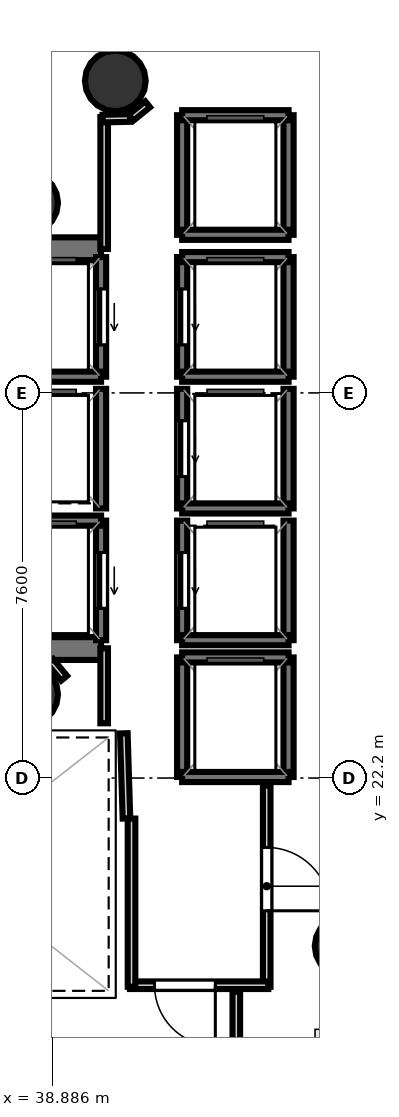
"""IFC4 building model, lengths in metres.
Left out: names, types, materials, properties, quantities, classifications, styles, units other than length and angle.
Written with IfcOpenShell. Run it as: python <this file> out.ifc"""

import sys

from ifc_helpers import new_model, si_unit, direction, frame, frame_2d, origin, origin_2d, place, context, subcontext, project, spatial, rectangle, hollow_circle, extrude, element, fill, save


model = new_model("IFC4")
c1 = context("Model", 3, precision=1e-05, world=origin(), true_north=direction((0.0, 1.0)))
c2 = subcontext(c1, "Body", "Model", "MODEL_VIEW")
j1 = project(units=[si_unit("LENGTHUNIT", "METRE"), si_unit("PLANEANGLEUNIT", "RADIAN")], contexts=[c1])
p1 = place(None, origin())
s1 = spatial("IfcSite", under=j1, at=p1, CompositionType="ELEMENT")
p2 = place(p1, origin())
s2 = spatial("IfcBuilding", under=s1, at=p2, CompositionType="ELEMENT")
p3 = place(p2, frame((0.0, 0.0, 207.7)))
s3 = spatial("IfcBuildingStorey", under=s2, at=p3, CompositionType="ELEMENT", Elevation=207.7)
p4 = place(p3, frame((29.33, 32.645, 0.0), z_axis=(0.0, 0.0, 1.0), x_axis=(1.0, 0.0, 0.0)))
e1 = element("IfcWall", 1, at=p4, inside=s3, PredefinedType="SHEAR", context=c2, shape_type="SweptSolid", body=[
    extrude(rectangle(XDim=10.52, YDim=0.45, at=frame_2d((5.26, 0.0))), origin(), (0.0, 0.0, 1.0), 3.52),
])
p5 = place(p4, frame((0.895, 0.0, 0.0)))
e2 = element("IfcOpeningElement", 2, at=p5, cuts=e1, PredefinedType="OPENING", context=c2, shape_type="SweptSolid", body=[
    extrude(rectangle(XDim=1.25, YDim=2.15, at=frame_2d((0.625, 1.075))), frame((0.0, 0.235, 0.0), z_axis=(0.0, -1.0, 0.0), x_axis=(1.0, 0.0, 0.0)), (0.0, 0.0, 1.0), 0.47),
])
p6 = place(p3, frame((29.33, 24.755, 0.0), z_axis=(0.0, 0.0, 1.0), x_axis=(1.0, 0.0, 0.0)))
e3 = element("IfcWall", 3, at=p6, inside=s3, PredefinedType="SHEAR", context=c2, shape_type="SweptSolid", body=[
    extrude(rectangle(XDim=10.52, YDim=0.45, at=frame_2d((5.26, 0.0))), origin(), (0.0, 0.0, 1.0), 3.52),
])
p7 = place(p6, frame((0.695, 0.0, 0.0)))
e4 = element("IfcOpeningElement", 4, at=p7, cuts=e3, PredefinedType="OPENING", context=c2, shape_type="SweptSolid", body=[
    extrude(rectangle(XDim=1.25, YDim=2.15, at=frame_2d((0.625, 1.075))), frame((0.0, 0.235, 0.0), z_axis=(0.0, -1.0, 0.0), x_axis=(1.0, 0.0, 0.0)), (0.0, 0.0, 1.0), 0.47),
])
for number, where, z_axis, x_axis in (
    (5, (38.4, 33.55, 0.0), (0.0, 0.0, 1.0), (1.0, 0.0, 0.0)),
    (6, (38.4, 23.85, 0.0), (0.0, 0.0, 1.0), (1.0, 0.0, 0.0)),
    (7, (40.131, 35.958, 0.0), (0.0, 0.0, 1.0), (1.0, 0.0, 0.0)),
    (8, (44.667, 18.883, 0.0), (0.0, 0.0, 1.0), (1.0, 0.0, 0.0)),
):
    element("IfcColumn", number, at=place(p3, frame(where, z_axis=z_axis, x_axis=x_axis)), inside=s3, PredefinedType="COLUMN", context=c2, shape_type="SweptSolid", body=[
        extrude(hollow_circle(Radius=0.6, WallThickness=0.03, at=origin_2d()), origin(), (0.0, 0.0, 1.0), 3.7),
    ])
p8 = place(p3, frame((39.85, 30.12, 0.0), z_axis=(0.0, 0.0, 1.0), x_axis=(0.0, 1.0, 0.0)))
e9 = element("IfcWall", 9, at=p8, inside=s3, PredefinedType="SOLIDWALL", context=c2, shape_type="SweptSolid", body=[
    extrude(rectangle(XDim=2.36, YDim=0.2, at=frame_2d((1.18, 0.0))), origin(), (0.0, 0.0, 1.0), 3.52),
])
p9 = place(p8, frame((0.63, 0.0, 0.0)))
e10 = element("IfcOpeningElement", 10, at=p9, cuts=e9, PredefinedType="OPENING", context=c2, shape_type="SweptSolid", body=[
    extrude(rectangle(XDim=1.1, YDim=2.15, at=frame_2d((0.55, 1.075))), frame((0.0, 0.11, 0.0), z_axis=(0.0, -1.0, 0.0), x_axis=(1.0, 0.0, 0.0)), (0.0, 0.0, 1.0), 0.22),
])
p10 = place(p3, frame((37.75, 30.12, 0.0), z_axis=(0.0, 0.0, 1.0), x_axis=(1.0, 0.0, 0.0)))
e11 = element("IfcWall", 11, at=p10, inside=s3, PredefinedType="SOLIDWALL", context=c2, shape_type="SweptSolid", body=[
    extrude(rectangle(XDim=2.1, YDim=0.2, at=frame_2d((1.05, 0.0))), origin(), (0.0, 0.0, 1.0), 3.52),
])
p11 = place(p3, frame((39.85, 24.92, 0.0), z_axis=(0.0, 0.0, 1.0), x_axis=(0.0, 1.0, 0.0)))
e12 = element("IfcWall", 12, at=p11, inside=s3, PredefinedType="SOLIDWALL", context=c2, shape_type="SweptSolid", body=[
    extrude(rectangle(XDim=2.36, YDim=0.2, at=frame_2d((1.18, 0.0))), origin(), (0.0, 0.0, 1.0), 3.52),
])
p12 = place(p11, frame((0.63, 0.0, 0.0)))
e13 = element("IfcOpeningElement", 13, at=p12, cuts=e12, PredefinedType="OPENING", context=c2, shape_type="SweptSolid", body=[
    extrude(rectangle(XDim=1.1, YDim=2.15, at=frame_2d((0.55, 1.075))), frame((0.0, 0.11, 0.0), z_axis=(0.0, -1.0, 0.0), x_axis=(1.0, 0.0, 0.0)), (0.0, 0.0, 1.0), 0.22),
])
p13 = place(p3, frame((37.75, 27.28, 0.0), z_axis=(0.0, 0.0, 1.0), x_axis=(1.0, 0.0, 0.0)))
e14 = element("IfcWall", 14, at=p13, inside=s3, PredefinedType="SOLIDWALL", context=c2, shape_type="SweptSolid", body=[
    extrude(rectangle(XDim=2.1, YDim=0.2, at=frame_2d((1.05, 0.0))), origin(), (0.0, 0.0, 1.0), 3.52),
])
p14 = place(p3, frame((43.55, 30.12, 0.0), z_axis=(0.0, 0.0, 1.0), x_axis=(0.0, 1.0, 0.0)))
e15 = element("IfcWall", 15, at=p14, inside=s3, PredefinedType="SOLIDWALL", context=c2, shape_type="SweptSolid", body=[
    extrude(rectangle(XDim=2.36, YDim=0.2, at=frame_2d((1.18, 0.0))), origin(), (0.0, 0.0, 1.0), 3.52),
])
p15 = place(p3, frame((41.45, 30.12, 0.0), z_axis=(0.0, 0.0, 1.0), x_axis=(0.0, 1.0, 0.0)))
e16 = element("IfcWall", 16, at=p15, inside=s3, PredefinedType="SOLIDWALL", context=c2, shape_type="SweptSolid", body=[
    extrude(rectangle(XDim=2.36, YDim=0.2, at=frame_2d((1.18, 0.0))), origin(), (0.0, 0.0, 1.0), 3.52),
])
p16 = place(p15, frame((0.63, 0.0, 0.0)))
e17 = element("IfcOpeningElement", 17, at=p16, cuts=e16, PredefinedType="OPENING", context=c2, shape_type="SweptSolid", body=[
    extrude(rectangle(XDim=1.1, YDim=2.15, at=frame_2d((0.55, 1.075))), frame((0.0, 0.11, 0.0), z_axis=(0.0, -1.0, 0.0), x_axis=(1.0, 0.0, 0.0)), (0.0, 0.0, 1.0), 0.22),
])
for number, where, z_axis, x_axis in (
    (18, (41.45, 32.48, 0.0), (0.0, 0.0, 1.0), (1.0, 0.0, 0.0)),
    (19, (41.45, 30.12, 0.0), (0.0, 0.0, 1.0), (1.0, 0.0, 0.0)),
):
    element("IfcWall", number, at=place(p3, frame(where, z_axis=z_axis, x_axis=x_axis)), inside=s3, PredefinedType="SOLIDWALL", context=c2, shape_type="SweptSolid", body=[
        extrude(rectangle(XDim=2.1, YDim=0.2, at=frame_2d((1.05, 0.0))), origin(), (0.0, 0.0, 1.0), 3.52),
    ])
p17 = place(p3, frame((43.55, 27.52, 0.0), z_axis=(0.0, 0.0, 1.0), x_axis=(0.0, 1.0, 0.0)))
e20 = element("IfcWall", 20, at=p17, inside=s3, PredefinedType="SOLIDWALL", context=c2, shape_type="SweptSolid", body=[
    extrude(rectangle(XDim=2.36, YDim=0.2, at=frame_2d((1.18, 0.0))), origin(), (0.0, 0.0, 1.0), 3.52),
])
p18 = place(p3, frame((41.45, 27.52, 0.0), z_axis=(0.0, 0.0, 1.0), x_axis=(0.0, 1.0, 0.0)))
e21 = element("IfcWall", 21, at=p18, inside=s3, PredefinedType="SOLIDWALL", context=c2, shape_type="SweptSolid", body=[
    extrude(rectangle(XDim=2.36, YDim=0.2, at=frame_2d((1.18, 0.0))), origin(), (0.0, 0.0, 1.0), 3.52),
])
p19 = place(p18, frame((0.63, 0.0, 0.0)))
e22 = element("IfcOpeningElement", 22, at=p19, cuts=e21, PredefinedType="OPENING", context=c2, shape_type="SweptSolid", body=[
    extrude(rectangle(XDim=1.1, YDim=2.15, at=frame_2d((0.55, 1.075))), frame((0.0, 0.11, 0.0), z_axis=(0.0, -1.0, 0.0), x_axis=(1.0, 0.0, 0.0)), (0.0, 0.0, 1.0), 0.22),
])
p20 = place(p3, frame((41.45, 27.52, 0.0), z_axis=(0.0, 0.0, 1.0), x_axis=(1.0, 0.0, 0.0)))
e23 = element("IfcWall", 23, at=p20, inside=s3, PredefinedType="SOLIDWALL", context=c2, shape_type="SweptSolid", body=[
    extrude(rectangle(XDim=2.1, YDim=0.2, at=frame_2d((1.05, 0.0))), origin(), (0.0, 0.0, 1.0), 3.52),
])
p21 = place(p3, frame((43.55, 24.92, 0.0), z_axis=(0.0, 0.0, 1.0), x_axis=(0.0, 1.0, 0.0)))
e24 = element("IfcWall", 24, at=p21, inside=s3, PredefinedType="SOLIDWALL", context=c2, shape_type="SweptSolid", body=[
    extrude(rectangle(XDim=2.36, YDim=0.2, at=frame_2d((1.18, 0.0))), origin(), (0.0, 0.0, 1.0), 3.52),
])
p22 = place(p3, frame((41.45, 24.92, 0.0), z_axis=(0.0, 0.0, 1.0), x_axis=(0.0, 1.0, 0.0)))
e25 = element("IfcWall", 25, at=p22, inside=s3, PredefinedType="SOLIDWALL", context=c2, shape_type="SweptSolid", body=[
    extrude(rectangle(XDim=2.36, YDim=0.2, at=frame_2d((1.18, 0.0))), origin(), (0.0, 0.0, 1.0), 3.52),
])
p23 = place(p22, frame((0.63, 0.0, 0.0)))
e26 = element("IfcOpeningElement", 26, at=p23, cuts=e25, PredefinedType="OPENING", context=c2, shape_type="SweptSolid", body=[
    extrude(rectangle(XDim=1.1, YDim=2.15, at=frame_2d((0.55, 1.075))), frame((0.0, 0.11, 0.0), z_axis=(0.0, -1.0, 0.0), x_axis=(1.0, 0.0, 0.0)), (0.0, 0.0, 1.0), 0.22),
])
p24 = place(p3, frame((41.45, 24.92, 0.0), z_axis=(0.0, 0.0, 1.0), x_axis=(1.0, 0.0, 0.0)))
e27 = element("IfcWall", 27, at=p24, inside=s3, PredefinedType="SOLIDWALL", context=c2, shape_type="SweptSolid", body=[
    extrude(rectangle(XDim=2.1, YDim=0.2, at=frame_2d((1.05, 0.0))), origin(), (0.0, 0.0, 1.0), 3.52),
])
p25 = place(p3, frame((39.85, 27.52, 0.0), z_axis=(0.0, 0.0, 1.0), x_axis=(0.0, 1.0, 0.0)))
e28 = element("IfcWall", 28, at=p25, inside=s3, PredefinedType="SOLIDWALL", context=c2, shape_type="SweptSolid", body=[
    extrude(rectangle(XDim=2.36, YDim=0.2, at=frame_2d((1.18, 0.0))), origin(), (0.0, 0.0, 1.0), 3.52),
])
for number, where, z_axis, x_axis in (
    (29, (43.55, 22.22, 0.0), (0.0, 0.0, 1.0), (0.0, 1.0, 0.0)),
    (30, (41.45, 22.22, 0.0), (0.0, 0.0, 1.0), (0.0, 1.0, 0.0)),
):
    element("IfcWall", number, at=place(p3, frame(where, z_axis=z_axis, x_axis=x_axis)), inside=s3, PredefinedType="SOLIDWALL", context=c2, shape_type="SweptSolid", body=[
        extrude(rectangle(XDim=2.36, YDim=0.2, at=frame_2d((1.18, 0.0))), origin(), (0.0, 0.0, 1.0), 3.52),
    ])
for number, where, z_axis, x_axis in (
    (31, (41.45, 24.58, 0.0), (0.0, 0.0, 1.0), (1.0, 0.0, 0.0)),
    (32, (41.45, 22.22, 0.0), (0.0, 0.0, 1.0), (1.0, 0.0, 0.0)),
):
    element("IfcWall", number, at=place(p3, frame(where, z_axis=z_axis, x_axis=x_axis)), inside=s3, PredefinedType="SOLIDWALL", context=c2, shape_type="SweptSolid", body=[
        extrude(rectangle(XDim=2.1, YDim=0.2, at=frame_2d((1.05, 0.0))), origin(), (0.0, 0.0, 1.0), 3.52),
    ])
for number, where, z_axis, x_axis in (
    (33, (43.55, 32.92, 0.0), (0.0, 0.0, 1.0), (0.0, 1.0, 0.0)),
    (34, (41.45, 32.92, 0.0), (0.0, 0.0, 1.0), (0.0, 1.0, 0.0)),
):
    element("IfcWall", number, at=place(p3, frame(where, z_axis=z_axis, x_axis=x_axis)), inside=s3, PredefinedType="SOLIDWALL", context=c2, shape_type="SweptSolid", body=[
        extrude(rectangle(XDim=2.36, YDim=0.2, at=frame_2d((1.18, 0.0))), origin(), (0.0, 0.0, 1.0), 3.52),
    ])
for number, where, z_axis, x_axis in (
    (35, (41.45, 35.28, 0.0), (0.0, 0.0, 1.0), (1.0, 0.0, 0.0)),
    (36, (41.45, 32.92, 0.0), (0.0, 0.0, 1.0), (1.0, 0.0, 0.0)),
):
    element("IfcWall", number, at=place(p3, frame(where, z_axis=z_axis, x_axis=x_axis)), inside=s3, PredefinedType="SOLIDWALL", context=c2, shape_type="SweptSolid", body=[
        extrude(rectangle(XDim=2.1, YDim=0.2, at=frame_2d((1.05, 0.0))), origin(), (0.0, 0.0, 1.0), 3.52),
    ])
p26 = place(p3, frame((40.351, 21.401, 0.0), z_axis=(0.0, 0.0, 1.0), x_axis=(-0.031058045979, 0.999517582527, 0.0)))
e37 = element("IfcWall", 37, at=p26, inside=s3, PredefinedType="PARTITIONING", context=c2, shape_type="SweptSolid", body=[
    extrude(rectangle(XDim=1.682, YDim=0.15, at=frame_2d((0.841, 0.0))), origin(), (0.0, 0.0, 1.0), 2.84),
])
p27 = place(p3, frame((39.911, 23.28, 0.0), z_axis=(0.0, 0.0, 1.0), x_axis=(0.0, 1.0, 0.0)))
e38 = element("IfcWall", 38, at=p27, inside=s3, PredefinedType="PARTITIONING", context=c2, shape_type="SweptSolid", body=[
    extrude(rectangle(XDim=1.48, YDim=0.15, at=frame_2d((0.74, 0.0))), origin(), (0.0, 0.0, 1.0), 2.84),
])
p28 = place(p3, frame((39.911, 32.64, 0.0), z_axis=(0.0, 0.0, 1.0), x_axis=(0.0, 1.0, 0.0)))
e39 = element("IfcWall", 39, at=p28, inside=s3, PredefinedType="PARTITIONING", context=c2, shape_type="SweptSolid", body=[
    extrude(rectangle(XDim=2.604, YDim=0.15, at=frame_2d((1.302, 0.0))), origin(), (0.0, 0.0, 1.0), 2.84),
])
p29 = place(p3, frame((39.881, 35.213, 0.0), z_axis=(0.0, 0.0, 1.0), x_axis=(0.999756500784, 0.02206669754, 0.0)))
e40 = element("IfcWall", 40, at=p29, inside=s3, PredefinedType="PARTITIONING", context=c2, shape_type="SweptSolid", body=[
    extrude(rectangle(XDim=0.542, YDim=0.15, at=frame_2d((0.271, 0.0))), origin(), (0.0, 0.0, 1.0), 2.84),
])
p30 = place(p3, frame((40.441, 35.232, 0.0), z_axis=(0.0, 0.0, 1.0), x_axis=(0.778714564707, 0.627378376033, 0.0)))
e41 = element("IfcWall", 41, at=p30, inside=s3, PredefinedType="PARTITIONING", context=c2, shape_type="SweptSolid", body=[
    extrude(rectangle(XDim=0.421, YDim=0.15, at=frame_2d((0.21, 0.0))), origin(), (0.0, 0.0, 1.0), 2.84),
])
p31 = place(p3, frame((43.119, 22.05, 0.0), z_axis=(0.0, 0.0, 1.0), x_axis=(0.0, -1.0, 0.0)))
e42 = element("IfcWall", 42, at=p31, inside=s3, PredefinedType="PARTITIONING", context=c2, shape_type="SweptSolid", body=[
    extrude(rectangle(XDim=3.97, YDim=0.15, at=frame_2d((1.985, 0.0))), origin(), (0.0, 0.0, 1.0), 2.84),
])
p32 = place(p31, frame((1.22, 0.0, 0.0)))
e43 = element("IfcOpeningElement", 43, at=p32, cuts=e42, PredefinedType="OPENING", context=c2, shape_type="SweptSolid", body=[
    extrude(rectangle(XDim=1.25, YDim=2.2, at=frame_2d((0.625, 1.1))), frame((0.0, 0.085, 0.0), z_axis=(0.0, -1.0, 0.0), x_axis=(1.0, 0.0, 0.0)), (0.0, 0.0, 1.0), 0.17),
])
p33 = place(p3, frame((43.15, 18.111, 0.0), z_axis=(0.0, 0.0, 1.0), x_axis=(-1.0, 0.0, 0.0)))
e44 = element("IfcWall", 44, at=p33, inside=s3, PredefinedType="PARTITIONING", context=c2, shape_type="SweptSolid", body=[
    extrude(rectangle(XDim=2.73, YDim=0.15, at=frame_2d((1.365, 0.0))), origin(), (0.0, 0.0, 1.0), 2.84),
])
p34 = place(p33, frame((1.045, 0.0, 0.0)))
e45 = element("IfcOpeningElement", 45, at=p34, cuts=e44, PredefinedType="OPENING", context=c2, shape_type="SweptSolid", body=[
    extrude(rectangle(XDim=1.2, YDim=2.15, at=frame_2d((0.6, 1.075))), frame((0.0, 0.085, 0.0), z_axis=(0.0, -1.0, 0.0), x_axis=(1.0, 0.0, 0.0)), (0.0, 0.0, 1.0), 0.17),
])
p35 = place(p3, frame((40.451, 18.08, 0.0), z_axis=(0.0, 0.0, 1.0), x_axis=(0.0, 1.0, 0.0)))
e46 = element("IfcWall", 46, at=p35, inside=s3, PredefinedType="PARTITIONING", context=c2, shape_type="SweptSolid", body=[
    extrude(rectangle(XDim=3.32, YDim=0.15, at=frame_2d((1.66, 0.0))), origin(), (0.0, 0.0, 1.0), 2.84),
])
p36 = place(p3, frame((39.121, 24.17, 0.0), z_axis=(0.0, 0.0, 1.0), x_axis=(-0.638008265708, 0.770029514296, 0.0)))
e47 = element("IfcWall", 47, at=p36, inside=s3, PredefinedType="PARTITIONING", context=c2, shape_type="SweptSolid", body=[
    extrude(rectangle(XDim=0.431, YDim=0.15, at=frame_2d((0.215, 0.0))), origin(), (0.0, 0.0, 1.0), 2.84),
])
p37 = place(p3, frame((42.519, 17.98, 0.0), z_axis=(0.0, 0.0, 1.0), x_axis=(0.0, -1.0, 0.0)))
e48 = element("IfcWall", 48, at=p37, inside=s3, PredefinedType="PARTITIONING", context=c2, shape_type="SweptSolid", body=[
    extrude(rectangle(XDim=2.973, YDim=0.15, at=frame_2d((1.487, 0.0))), origin(), (0.0, 0.0, 1.0), 2.84),
])
p38 = place(p9, origin())
e49 = element("IfcDoor", 49, at=p38, inside=s3, OperationType="SLIDING_TO_LEFT", PredefinedType="DOOR", context=c2, shape_type="SweptSolid", body=[
    extrude(rectangle(XDim=1.1, YDim=2.15, at=frame_2d((0.55, 1.075))), frame((0.0, 0.025, 0.0), z_axis=(0.0, -1.0, 0.0), x_axis=(1.0, 0.0, 0.0)), (0.0, 0.0, 1.0), 0.05),
])
fill(e10, e49)
p39 = place(p12, origin())
e50 = element("IfcDoor", 50, at=p39, inside=s3, OperationType="SLIDING_TO_LEFT", PredefinedType="DOOR", context=c2, shape_type="SweptSolid", body=[
    extrude(rectangle(XDim=1.1, YDim=2.15, at=frame_2d((0.55, 1.075))), frame((0.0, 0.025, 0.0), z_axis=(0.0, -1.0, 0.0), x_axis=(1.0, 0.0, 0.0)), (0.0, 0.0, 1.0), 0.05),
])
fill(e13, e50)
p40 = place(p16, origin())
e51 = element("IfcDoor", 51, at=p40, inside=s3, OperationType="SLIDING_TO_LEFT", PredefinedType="DOOR", context=c2, shape_type="SweptSolid", body=[
    extrude(rectangle(XDim=1.1, YDim=2.15, at=frame_2d((0.55, 1.075))), frame((0.0, 0.025, 0.0), z_axis=(0.0, -1.0, 0.0), x_axis=(1.0, 0.0, 0.0)), (0.0, 0.0, 1.0), 0.05),
])
fill(e17, e51)
p41 = place(p19, origin())
e52 = element("IfcDoor", 52, at=p41, inside=s3, OperationType="SLIDING_TO_LEFT", PredefinedType="DOOR", context=c2, shape_type="SweptSolid", body=[
    extrude(rectangle(XDim=1.1, YDim=2.15, at=frame_2d((0.55, 1.075))), frame((0.0, 0.025, 0.0), z_axis=(0.0, -1.0, 0.0), x_axis=(1.0, 0.0, 0.0)), (0.0, 0.0, 1.0), 0.05),
])
fill(e22, e52)
p42 = place(p23, origin())
e53 = element("IfcDoor", 53, at=p42, inside=s3, OperationType="SLIDING_TO_LEFT", PredefinedType="DOOR", context=c2, shape_type="SweptSolid", body=[
    extrude(rectangle(XDim=1.1, YDim=2.15, at=frame_2d((0.55, 1.075))), frame((0.0, 0.025, 0.0), z_axis=(0.0, -1.0, 0.0), x_axis=(1.0, 0.0, 0.0)), (0.0, 0.0, 1.0), 0.05),
])
fill(e26, e53)
p43 = place(p34, origin())
e54 = element("IfcDoor", 54, at=p43, inside=s3, OperationType="SINGLE_SWING_LEFT", PredefinedType="DOOR", context=c2, shape_type="SweptSolid", body=[
    extrude(rectangle(XDim=1.2, YDim=2.15, at=frame_2d((0.6, 1.075))), frame((0.0, 0.025, 0.0), z_axis=(0.0, -1.0, 0.0), x_axis=(1.0, 0.0, 0.0)), (0.0, 0.0, 1.0), 0.05),
])
fill(e45, e54)
p44 = place(p32, origin())
e55 = element("IfcDoor", 55, at=p44, inside=s3, OperationType="SINGLE_SWING_RIGHT", PredefinedType="DOOR", context=c2, shape_type="SweptSolid", body=[
    extrude(rectangle(XDim=1.25, YDim=2.2, at=frame_2d((0.625, 1.1))), frame((0.0, 0.025, 0.0), z_axis=(0.0, -1.0, 0.0), x_axis=(1.0, 0.0, 0.0)), (0.0, 0.0, 1.0), 0.05),
])
fill(e43, e55)
save(model, sys.argv[1])
